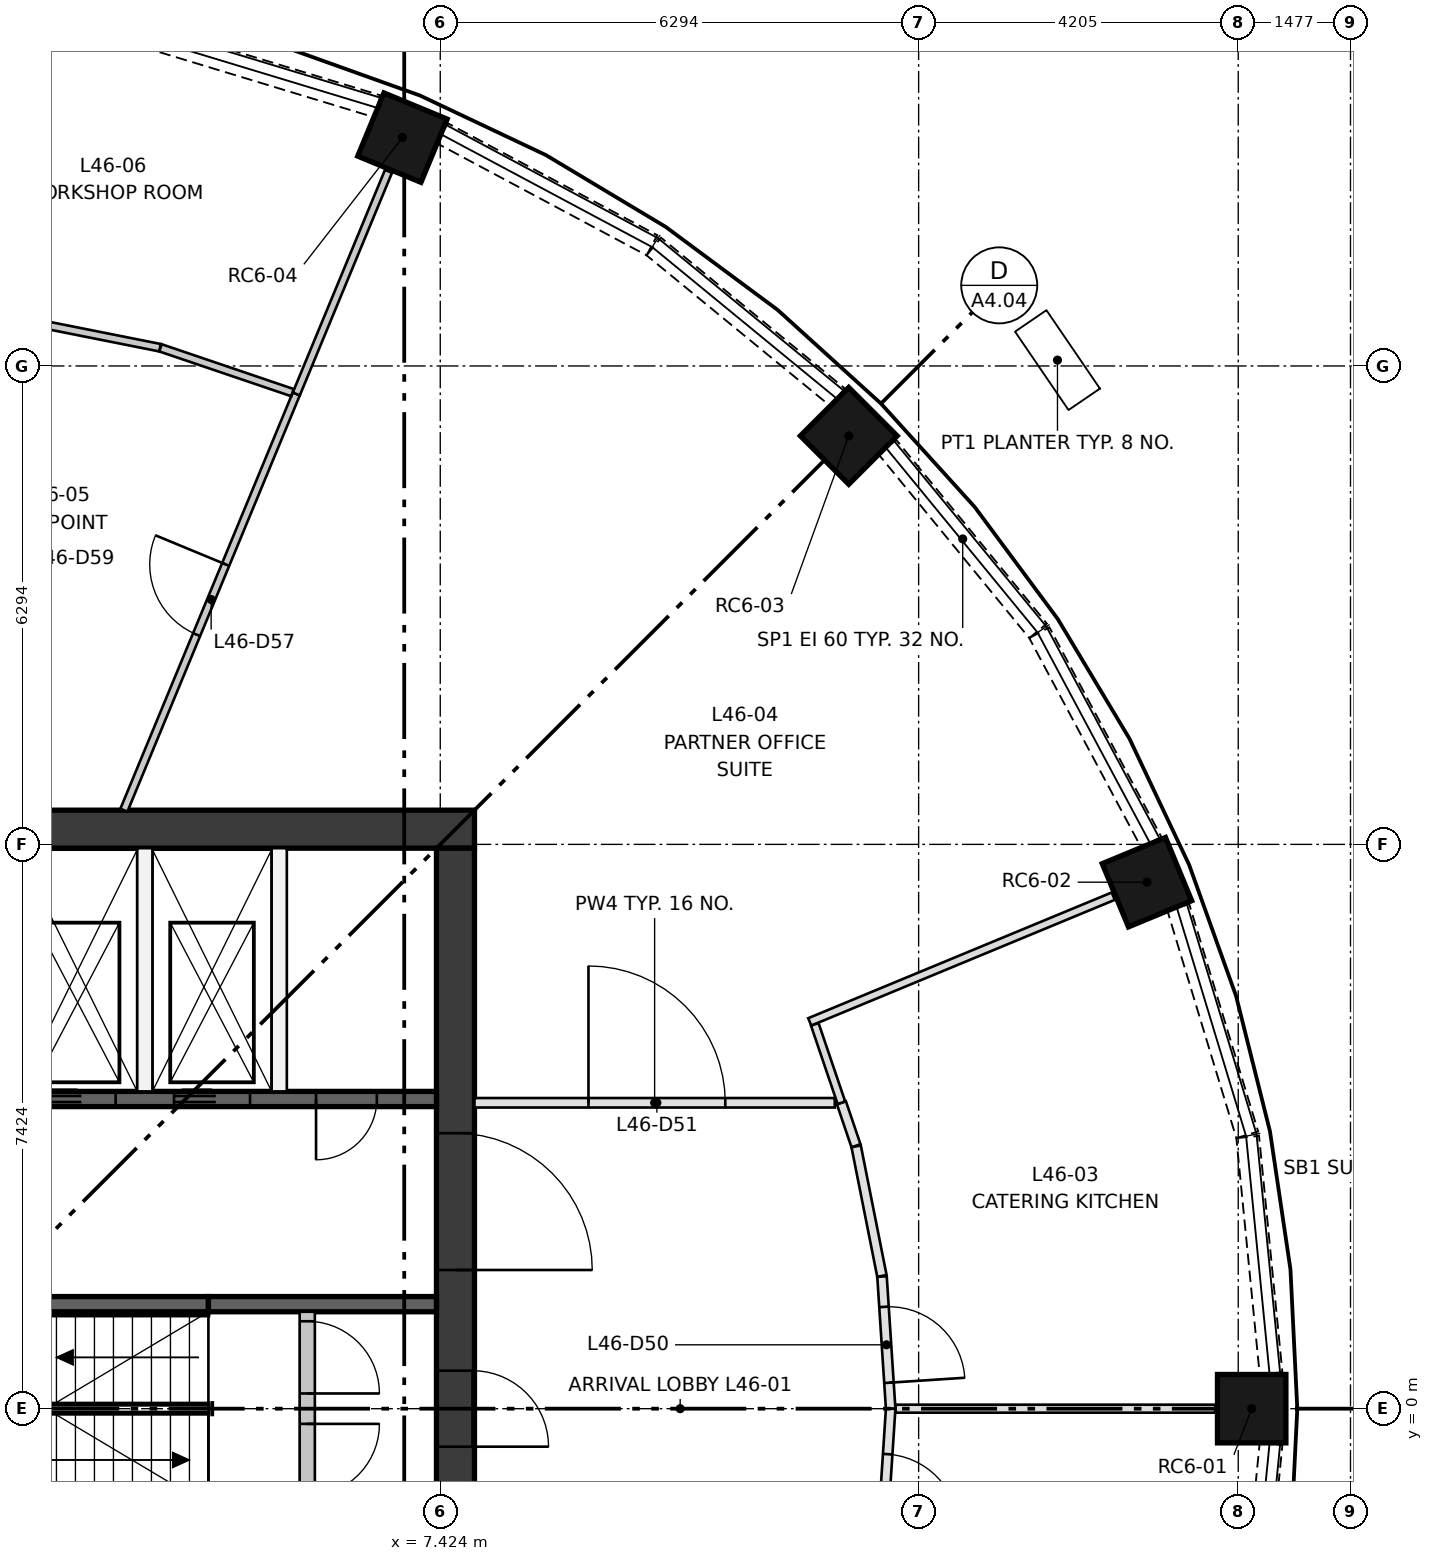
"""IFC4 building model, lengths in metres.
Left out: names, types, materials, properties, quantities, classifications, styles, units other than length and angle.
Written with IfcOpenShell. Run it as: python <this file> out.ifc"""

import sys

from ifc_helpers import new_model, si_unit, direction, frame, frame_2d, origin, origin_2d, place, context, subcontext, project, spatial, rectangle, extrude, element, fill, save


model = new_model("IFC4")
c1 = context("Model", 3, precision=1e-05, world=origin(), true_north=direction((0.0, 1.0)))
c2 = subcontext(c1, "Body", "Model", "MODEL_VIEW")
j1 = project(units=[si_unit("LENGTHUNIT", "METRE"), si_unit("PLANEANGLEUNIT", "RADIAN")], contexts=[c1])
p1 = place(None, origin())
s1 = spatial("IfcSite", under=j1, at=p1, CompositionType="ELEMENT")
p2 = place(p1, origin())
s2 = spatial("IfcBuilding", under=s1, at=p2, CompositionType="ELEMENT")
p3 = place(p2, frame((0.0, 0.0, 174.25)))
s3 = spatial("IfcBuildingStorey", under=s2, at=p3, CompositionType="ELEMENT", Elevation=174.25)
for number, where, z_axis, x_axis in (
    (1, (18.1, 0.0, 0.0), (0.0, 0.0, 1.0), (1.0, 0.0, 0.0)),
    (2, (16.722, 6.927, 0.0), (0.0, 0.0, 1.0), (0.924, 0.383, 0.0)),
    (3, (12.799, 12.799, 0.0), (0.0, 0.0, 1.0), (0.707, 0.707, 0.0)),
    (4, (6.927, 16.722, 0.0), (0.0, 0.0, 1.0), (0.383, 0.924, 0.0)),
):
    element("IfcColumn", number, at=place(p3, frame(where, z_axis=z_axis, x_axis=x_axis)), inside=s3, PredefinedType="COLUMN", context=c2, shape_type="SweptSolid", body=[
        extrude(rectangle(XDim=0.9, YDim=0.9, at=origin_2d()), origin(), (0.0, 0.0, 1.0), 3.35),
    ])
p4 = place(p3, frame((-7.874, 7.624, 0.0), z_axis=(0.0, 0.0, 1.0), x_axis=(1.0, 0.0, 0.0)))
e5 = element("IfcWall", 5, at=p4, inside=s3, PredefinedType="SHEAR", context=c2, shape_type="SweptSolid", body=[
    extrude(rectangle(XDim=15.748, YDim=0.5, at=frame_2d((7.874, 0.0))), origin(), (0.0, 0.0, 1.0), 3.35),
])
p5 = place(p3, frame((7.624, -7.374, 0.0), z_axis=(0.0, 0.0, 1.0), x_axis=(0.0, 1.0, 0.0)))
e6 = element("IfcWall", 6, at=p5, inside=s3, PredefinedType="SHEAR", context=c2, shape_type="SweptSolid", body=[
    extrude(rectangle(XDim=14.748, YDim=0.5, at=frame_2d((7.374, 0.0))), origin(), (0.0, 0.0, 1.0), 3.35),
])
p6 = place(p5, frame((6.874, 0.0, 0.0)))
e7 = element("IfcOpeningElement", 7, at=p6, cuts=e6, PredefinedType="OPENING", context=c2, shape_type="SweptSolid", body=[
    extrude(rectangle(XDim=1.0, YDim=2.1, at=frame_2d((0.5, 1.05))), frame((0.0, 0.26, 0.0), z_axis=(0.0, -1.0, 0.0), x_axis=(1.0, 0.0, 0.0)), (0.0, 0.0, 1.0), 0.52),
])
p7 = place(p5, frame((3.75, 0.0, 0.0)))
e8 = element("IfcOpeningElement", 8, at=p7, cuts=e6, PredefinedType="OPENING", context=c2, shape_type="SweptSolid", body=[
    extrude(rectangle(XDim=1.8, YDim=2.1, at=frame_2d((0.9, 1.05))), frame((0.0, 0.26, 0.0), z_axis=(0.0, -1.0, 0.0), x_axis=(1.0, 0.0, 0.0)), (0.0, 0.0, 1.0), 0.52),
])
p8 = place(p5, frame((9.198, 0.0, 0.0)))
e9 = element("IfcOpeningElement", 9, at=p8, cuts=e6, PredefinedType="OPENING", context=c2, shape_type="SweptSolid", body=[
    extrude(rectangle(XDim=1.8, YDim=2.1, at=frame_2d((0.9, 1.05))), frame((0.0, 0.26, 0.0), z_axis=(0.0, -1.0, 0.0), x_axis=(1.0, 0.0, 0.0)), (0.0, 0.0, 1.0), 0.52),
])
p9 = place(p3, frame((0.0, 4.074, 0.0), z_axis=(0.0, 0.0, 1.0), x_axis=(1.0, 0.0, 0.0)))
e10 = element("IfcWall", 10, at=p9, inside=s3, PredefinedType="SHEAR", context=c2, shape_type="SweptSolid", body=[
    extrude(rectangle(XDim=7.374, YDim=0.2, at=frame_2d((3.687, 0.0))), origin(), (0.0, 0.0, 1.0), 3.0),
])
p10 = place(p9, frame((0.384, 0.0, 0.0)))
e11 = element("IfcOpeningElement", 11, at=p10, cuts=e10, PredefinedType="OPENING", context=c2, shape_type="SweptSolid", body=[
    extrude(rectangle(XDim=1.0, YDim=2.1, at=frame_2d((0.5, 1.05))), frame((0.0, 0.11, 0.0), z_axis=(0.0, -1.0, 0.0), x_axis=(1.0, 0.0, 0.0)), (0.0, 0.0, 1.0), 0.22),
])
p11 = place(p9, frame((2.153, 0.0, 0.0)))
e12 = element("IfcOpeningElement", 12, at=p11, cuts=e10, PredefinedType="OPENING", context=c2, shape_type="SweptSolid", body=[
    extrude(rectangle(XDim=1.0, YDim=2.1, at=frame_2d((0.5, 1.05))), frame((0.0, 0.11, 0.0), z_axis=(0.0, -1.0, 0.0), x_axis=(1.0, 0.0, 0.0)), (0.0, 0.0, 1.0), 0.22),
])
p12 = place(p9, frame((3.921, 0.0, 0.0)))
e13 = element("IfcOpeningElement", 13, at=p12, cuts=e10, PredefinedType="OPENING", context=c2, shape_type="SweptSolid", body=[
    extrude(rectangle(XDim=1.0, YDim=2.1, at=frame_2d((0.5, 1.05))), frame((0.0, 0.11, 0.0), z_axis=(0.0, -1.0, 0.0), x_axis=(1.0, 0.0, 0.0)), (0.0, 0.0, 1.0), 0.22),
])
p13 = place(p9, frame((5.79, 0.0, 0.0)))
e14 = element("IfcOpeningElement", 14, at=p13, cuts=e10, PredefinedType="OPENING", context=c2, shape_type="SweptSolid", body=[
    extrude(rectangle(XDim=0.8, YDim=2.1, at=frame_2d((0.4, 1.05))), frame((0.0, 0.11, 0.0), z_axis=(0.0, -1.0, 0.0), x_axis=(1.0, 0.0, 0.0)), (0.0, 0.0, 1.0), 0.22),
])
p14 = place(p3, frame((0.0, 1.375, 0.0), z_axis=(0.0, 0.0, 1.0), x_axis=(1.0, 0.0, 0.0)))
e15 = element("IfcWall", 15, at=p14, inside=s3, PredefinedType="SHEAR", context=c2, shape_type="SweptSolid", body=[
    extrude(rectangle(XDim=4.374, YDim=0.2, at=frame_2d((2.187, 0.0))), origin(), (0.0, 0.0, 1.0), 3.0),
])
p15 = place(p3, frame((4.374, 1.375, 0.0), z_axis=(0.0, 0.0, 1.0), x_axis=(1.0, 0.0, 0.0)))
e16 = element("IfcWall", 16, at=p15, inside=s3, PredefinedType="SHEAR", context=c2, shape_type="SweptSolid", body=[
    extrude(rectangle(XDim=3.0, YDim=0.2, at=frame_2d((1.5, 0.0))), origin(), (0.0, 0.0, 1.0), 3.0),
])
for number, where, z_axis, x_axis in (
    (17, (3.537, 4.174, 0.0), (0.0, 0.0, 1.0), (0.0, 1.0, 0.0)),
    (18, (5.305, 4.174, 0.0), (0.0, 0.0, 1.0), (0.0, 1.0, 0.0)),
):
    element("IfcWall", number, at=place(p3, frame(where, z_axis=z_axis, x_axis=x_axis)), inside=s3, PredefinedType="PARTITIONING", context=c2, shape_type="SweptSolid", body=[
        extrude(rectangle(XDim=3.2, YDim=0.2, at=frame_2d((1.6, 0.0))), origin(), (0.0, 0.0, 1.0), 3.0),
    ])
p16 = place(p3, frame((5.674, -1.275, 0.0), z_axis=(0.0, 0.0, 1.0), x_axis=(0.0, 1.0, 0.0)))
e19 = element("IfcWall", 19, at=p16, inside=s3, PredefinedType="PARTITIONING", context=c2, shape_type="SweptSolid", body=[
    extrude(rectangle(XDim=2.55, YDim=0.2, at=frame_2d((1.275, 0.0))), origin(), (0.0, 0.0, 1.0), 3.0),
])
p17 = place(p16, frame((0.125, 0.0, 0.0)))
e20 = element("IfcOpeningElement", 20, at=p17, cuts=e19, PredefinedType="OPENING", context=c2, shape_type="SweptSolid", body=[
    extrude(rectangle(XDim=0.95, YDim=2.1, at=frame_2d((0.475, 1.05))), frame((0.0, 0.11, 0.0), z_axis=(0.0, -1.0, 0.0), x_axis=(1.0, 0.0, 0.0)), (0.0, 0.0, 1.0), 0.22),
])
p18 = place(p16, frame((1.475, 0.0, 0.0)))
e21 = element("IfcOpeningElement", 21, at=p18, cuts=e19, PredefinedType="OPENING", context=c2, shape_type="SweptSolid", body=[
    extrude(rectangle(XDim=0.95, YDim=2.1, at=frame_2d((0.475, 1.05))), frame((0.0, 0.11, 0.0), z_axis=(0.0, -1.0, 0.0), x_axis=(1.0, 0.0, 0.0)), (0.0, 0.0, 1.0), 0.22),
])
p19 = place(p3, frame((18.354, 0.464, 0.0), z_axis=(0.0, 0.0, 1.0), x_axis=(-0.098188848083, 0.995167799978, 0.0)))
e22 = element("IfcWall", 22, at=p19, inside=s3, PredefinedType="SOLIDWALL", context=c2, shape_type="SweptSolid", body=[
    extrude(rectangle(XDim=3.125, YDim=0.3, at=frame_2d((1.563, 0.0))), origin(), (0.0, 0.0, 1.0), 0.9),
])
p20 = place(p3, frame((18.042, 3.604, 0.0), z_axis=(0.0, 0.0, 1.0), x_axis=(-0.290083245834, 0.957001416136, 0.0)))
e23 = element("IfcWall", 23, at=p20, inside=s3, PredefinedType="SOLIDWALL", context=c2, shape_type="SweptSolid", body=[
    extrude(rectangle(XDim=3.127, YDim=0.3, at=frame_2d((1.563, 0.0))), origin(), (0.0, 0.0, 1.0), 0.9),
])
p21 = place(p3, frame((16.779, 7.452, 0.0), z_axis=(0.0, 0.0, 1.0), x_axis=(-0.47120441036, 0.882024038027, 0.0)))
e24 = element("IfcWall", 24, at=p21, inside=s3, PredefinedType="SOLIDWALL", context=c2, shape_type="SweptSolid", body=[
    extrude(rectangle(XDim=3.125, YDim=0.3, at=frame_2d((1.562, 0.0))), origin(), (0.0, 0.0, 1.0), 0.9),
])
for number, where, z_axis, x_axis in (
    (25, (15.29, 10.234, 0.0), (0.0, 0.0, 1.0), (-0.634, 0.773, 0.0)),
    (26, (12.651, 13.306, 0.0), (0.0, 0.0, 1.0), (-0.773, 0.634, 0.0)),
):
    element("IfcWall", number, at=place(p3, frame(where, z_axis=z_axis, x_axis=x_axis)), inside=s3, PredefinedType="SOLIDWALL", context=c2, shape_type="SweptSolid", body=[
        extrude(rectangle(XDim=3.127, YDim=0.3, at=frame_2d((1.563, 0.0))), origin(), (0.0, 0.0, 1.0), 0.9),
    ])
p22 = place(p3, frame((10.209, 15.306, 0.0), z_axis=(0.0, 0.0, 1.0), x_axis=(-0.882024038027, 0.47120441036, 0.0)))
e27 = element("IfcWall", 27, at=p22, inside=s3, PredefinedType="SOLIDWALL", context=c2, shape_type="SweptSolid", body=[
    extrude(rectangle(XDim=3.125, YDim=0.3, at=frame_2d((1.562, 0.0))), origin(), (0.0, 0.0, 1.0), 0.9),
])
p23 = place(p3, frame((6.596, 17.135, 0.0), z_axis=(0.0, 0.0, 1.0), x_axis=(-0.957001416136, 0.290083245834, 0.0)))
e28 = element("IfcWall", 28, at=p23, inside=s3, PredefinedType="SOLIDWALL", context=c2, shape_type="SweptSolid", body=[
    extrude(rectangle(XDim=3.127, YDim=0.3, at=frame_2d((1.563, 0.0))), origin(), (0.0, 0.0, 1.0), 0.9),
])
p24 = place(p3, frame((18.048, -3.574, 0.0), z_axis=(0.0, 0.0, 1.0), x_axis=(0.098188848083, 0.995167799978, 0.0)))
e29 = element("IfcWall", 29, at=p24, inside=s3, PredefinedType="SOLIDWALL", context=c2, shape_type="SweptSolid", body=[
    extrude(rectangle(XDim=3.125, YDim=0.3, at=frame_2d((1.563, 0.0))), origin(), (0.0, 0.0, 1.0), 0.9),
])
p25 = place(p3, frame((12.702, 4.024, 0.0), z_axis=(0.0, 0.0, 1.0), x_axis=(0.321374914787, -0.946952038989, 0.0)))
e30 = element("IfcWall", 30, at=p25, inside=s3, PredefinedType="PARTITIONING", context=c2, shape_type="SweptSolid", body=[
    extrude(rectangle(XDim=0.597, YDim=0.125, at=frame_2d((0.299, 0.0))), origin(), (0.0, 0.0, 1.0), 3.0),
])
p26 = place(p3, frame((12.896, 3.451, 0.0), z_axis=(0.0, 0.0, 1.0), x_axis=(0.195116516296, -0.980780069673, 0.0)))
e31 = element("IfcWall", 31, at=p26, inside=s3, PredefinedType="PARTITIONING", context=c2, shape_type="SweptSolid", body=[
    extrude(rectangle(XDim=1.738, YDim=0.125, at=frame_2d((0.869, 0.0))), origin(), (0.0, 0.0, 1.0), 3.0),
])
p27 = place(p3, frame((13.236, 1.738, 0.0), z_axis=(0.0, 0.0, 1.0), x_axis=(0.065449256286, -0.997855898841, 0.0)))
e32 = element("IfcWall", 32, at=p27, inside=s3, PredefinedType="PARTITIONING", context=c2, shape_type="SweptSolid", body=[
    extrude(rectangle(XDim=1.742, YDim=0.125, at=frame_2d((0.871, 0.0))), origin(), (0.0, 0.0, 1.0), 3.0),
])
p28 = place(p27, frame((0.4, 0.0, 0.0)))
e33 = element("IfcOpeningElement", 33, at=p28, cuts=e32, PredefinedType="OPENING", context=c2, shape_type="SweptSolid", body=[
    extrude(rectangle(XDim=1.0, YDim=2.1, at=frame_2d((0.5, 1.05))), frame((0.0, 0.073, 0.0), z_axis=(0.0, -1.0, 0.0), x_axis=(1.0, 0.0, 0.0)), (0.0, 0.0, 1.0), 0.145),
])
p29 = place(p3, frame((7.874, 4.024, 0.0), z_axis=(0.0, 0.0, 1.0), x_axis=(1.0, 0.0, 0.0)))
e34 = element("IfcWall", 34, at=p29, inside=s3, PredefinedType="PARTITIONING", context=c2, shape_type="SweptSolid", body=[
    extrude(rectangle(XDim=4.741, YDim=0.125, at=frame_2d((2.37, 0.0))), origin(), (0.0, 0.0, 1.0), 3.0),
])
p30 = place(p29, frame((1.5, 0.0, 0.0)))
e35 = element("IfcOpeningElement", 35, at=p30, cuts=e34, PredefinedType="OPENING", context=c2, shape_type="SweptSolid", body=[
    extrude(rectangle(XDim=1.8, YDim=2.1, at=frame_2d((0.9, 1.05))), frame((0.0, 0.073, 0.0), z_axis=(0.0, -1.0, 0.0), x_axis=(1.0, 0.0, 0.0)), (0.0, 0.0, 1.0), 0.145),
])
p31 = place(p3, frame((13.35, 0.0, 0.0), z_axis=(0.0, 0.0, 1.0), x_axis=(-0.065449256286, -0.997855898841, 0.0)))
e36 = element("IfcWall", 36, at=p31, inside=s3, PredefinedType="PARTITIONING", context=c2, shape_type="SweptSolid", body=[
    extrude(rectangle(XDim=1.742, YDim=0.125, at=frame_2d((0.871, 0.0))), origin(), (0.0, 0.0, 1.0), 3.0),
])
p32 = place(p31, frame((0.6, 0.0, 0.0)))
e37 = element("IfcOpeningElement", 37, at=p32, cuts=e36, PredefinedType="OPENING", context=c2, shape_type="SweptSolid", body=[
    extrude(rectangle(XDim=1.0, YDim=2.1, at=frame_2d((0.5, 1.05))), frame((0.0, 0.073, 0.0), z_axis=(0.0, -1.0, 0.0), x_axis=(1.0, 0.0, 0.0)), (0.0, 0.0, 1.0), 0.145),
])
p33 = place(p3, frame((12.285, 5.089, 0.0), z_axis=(0.0, 0.0, 1.0), x_axis=(0.923865378524, 0.382717601325, 0.0)))
e38 = element("IfcWall", 38, at=p33, inside=s3, PredefinedType="PARTITIONING", context=c2, shape_type="SweptSolid", body=[
    extrude(rectangle(XDim=4.323, YDim=0.105, at=frame_2d((2.161, 0.0))), origin(), (0.0, 0.0, 1.0), 3.0),
])
p34 = place(p3, frame((12.702, 4.024, 0.0), z_axis=(0.0, 0.0, 1.0), x_axis=(-0.321468654442, 0.946920220616, 0.0)))
e39 = element("IfcWall", 39, at=p34, inside=s3, PredefinedType="PARTITIONING", context=c2, shape_type="SweptSolid", body=[
    extrude(rectangle(XDim=1.089, YDim=0.105, at=frame_2d((0.544, 0.0))), origin(), (0.0, 0.0, 1.0), 3.0),
])
p35 = place(p3, frame((17.62, 0.0, 0.0), z_axis=(0.0, 0.0, 1.0), x_axis=(-1.0, 0.0, 0.0)))
e40 = element("IfcWall", 40, at=p35, inside=s3, PredefinedType="PARTITIONING", context=c2, shape_type="SweptSolid", body=[
    extrude(rectangle(XDim=4.204, YDim=0.105, at=frame_2d((2.102, 0.0))), origin(), (0.0, 0.0, 1.0), 3.0),
])
p36 = place(p3, frame((3.261, 7.874, 0.0), z_axis=(0.0, 0.0, 1.0), x_axis=(0.382690105068, 0.923876768559, 0.0)))
e41 = element("IfcWall", 41, at=p36, inside=s3, PredefinedType="PARTITIONING", context=c2, shape_type="SweptSolid", body=[
    extrude(rectangle(XDim=5.927, YDim=0.1, at=frame_2d((2.964, 0.0))), origin(), (0.0, 0.0, 1.0), 3.0),
])
p37 = place(p36, frame((2.5, 0.0, 0.0)))
e42 = element("IfcOpeningElement", 42, at=p37, cuts=e41, PredefinedType="OPENING", context=c2, shape_type="SweptSolid", body=[
    extrude(rectangle(XDim=1.0, YDim=2.1, at=frame_2d((0.5, 1.05))), frame((0.0, 0.06, 0.0), z_axis=(0.0, -1.0, 0.0), x_axis=(1.0, 0.0, 0.0)), (0.0, 0.0, 1.0), 0.12),
])
p38 = place(p3, frame((5.53, 13.35, 0.0), z_axis=(0.0, 0.0, 1.0), x_axis=(0.382689618566, 0.923876970079, 0.0)))
e43 = element("IfcWall", 43, at=p38, inside=s3, PredefinedType="PARTITIONING", context=c2, shape_type="SweptSolid", body=[
    extrude(rectangle(XDim=3.17, YDim=0.1, at=frame_2d((1.585, 0.0))), origin(), (0.0, 0.0, 1.0), 3.0),
])
p39 = place(p3, frame((1.889, 14.326, 0.0), z_axis=(0.0, 0.0, 1.0), x_axis=(0.980789493394, -0.195069140684, 0.0)))
e44 = element("IfcWall", 44, at=p39, inside=s3, PredefinedType="PARTITIONING", context=c2, shape_type="SweptSolid", body=[
    extrude(rectangle(XDim=1.884, YDim=0.1, at=frame_2d((0.942, 0.0))), origin(), (0.0, 0.0, 1.0), 3.0),
])
p40 = place(p3, frame((3.743, 13.957, 0.0), z_axis=(0.0, 0.0, 1.0), x_axis=(0.946938181516, -0.321415743839, 0.0)))
e45 = element("IfcWall", 45, at=p40, inside=s3, PredefinedType="PARTITIONING", context=c2, shape_type="SweptSolid", body=[
    extrude(rectangle(XDim=1.834, YDim=0.1, at=frame_2d((0.917, 0.0))), origin(), (0.0, 0.0, 1.0), 3.0),
])
p41 = place(p11, frame((1.0, 0.0, 0.0), z_axis=(0.0, 0.0, 1.0), x_axis=(-1.0, 0.0, 0.0)))
e46 = element("IfcDoor", 46, at=p41, inside=s3, OperationType="DOUBLE_DOOR_SLIDING", PredefinedType="DOOR", context=c2, shape_type="SweptSolid", body=[
    extrude(rectangle(XDim=1.0, YDim=2.1, at=frame_2d((0.5, 1.05))), frame((0.0, 0.025, 0.0), z_axis=(0.0, -1.0, 0.0), x_axis=(1.0, 0.0, 0.0)), (0.0, 0.0, 1.0), 0.05),
])
fill(e12, e46)
p42 = place(p12, frame((1.0, 0.0, 0.0), z_axis=(0.0, 0.0, 1.0), x_axis=(-1.0, 0.0, 0.0)))
e47 = element("IfcDoor", 47, at=p42, inside=s3, OperationType="DOUBLE_DOOR_SLIDING", PredefinedType="DOOR", context=c2, shape_type="SweptSolid", body=[
    extrude(rectangle(XDim=1.0, YDim=2.1, at=frame_2d((0.5, 1.05))), frame((0.0, 0.025, 0.0), z_axis=(0.0, -1.0, 0.0), x_axis=(1.0, 0.0, 0.0)), (0.0, 0.0, 1.0), 0.05),
])
fill(e13, e47)
p43 = place(p17, frame((0.95, 0.0, 0.0), z_axis=(0.0, 0.0, 1.0), x_axis=(-1.0, 0.0, 0.0)))
e48 = element("IfcDoor", 48, at=p43, inside=s3, OperationType="SINGLE_SWING_RIGHT", PredefinedType="DOOR", context=c2, shape_type="SweptSolid", body=[
    extrude(rectangle(XDim=0.95, YDim=2.1, at=frame_2d((0.475, 1.05))), frame((0.0, 0.025, 0.0), z_axis=(0.0, -1.0, 0.0), x_axis=(1.0, 0.0, 0.0)), (0.0, 0.0, 1.0), 0.05),
])
fill(e20, e48)
p44 = place(p18, frame((0.95, 0.0, 0.0), z_axis=(0.0, 0.0, 1.0), x_axis=(-1.0, 0.0, 0.0)))
e49 = element("IfcDoor", 49, at=p44, inside=s3, OperationType="SINGLE_SWING_LEFT", PredefinedType="DOOR", context=c2, shape_type="SweptSolid", body=[
    extrude(rectangle(XDim=0.95, YDim=2.1, at=frame_2d((0.475, 1.05))), frame((0.0, 0.025, 0.0), z_axis=(0.0, -1.0, 0.0), x_axis=(1.0, 0.0, 0.0)), (0.0, 0.0, 1.0), 0.05),
])
fill(e21, e49)
p45 = place(p13, frame((0.8, 0.0, 0.0), z_axis=(0.0, 0.0, 1.0), x_axis=(-1.0, 0.0, 0.0)))
e50 = element("IfcDoor", 50, at=p45, inside=s3, OperationType="SINGLE_SWING_LEFT", PredefinedType="DOOR", context=c2, shape_type="SweptSolid", body=[
    extrude(rectangle(XDim=0.8, YDim=2.1, at=frame_2d((0.4, 1.05))), frame((0.0, 0.025, 0.0), z_axis=(0.0, -1.0, 0.0), x_axis=(1.0, 0.0, 0.0)), (0.0, 0.0, 1.0), 0.05),
])
fill(e14, e50)
p46 = place(p6, frame((1.0, 0.0, 0.0), z_axis=(0.0, 0.0, 1.0), x_axis=(-1.0, 0.0, 0.0)))
e51 = element("IfcDoor", 51, at=p46, inside=s3, OperationType="SINGLE_SWING_LEFT", PredefinedType="DOOR", context=c2, shape_type="SweptSolid", body=[
    extrude(rectangle(XDim=1.0, YDim=2.1, at=frame_2d((0.5, 1.05))), frame((0.0, 0.25, 0.0), z_axis=(0.0, -1.0, 0.0), x_axis=(1.0, 0.0, 0.0)), (0.0, 0.0, 1.0), 0.05),
])
fill(e7, e51)
p47 = place(p8, frame((1.8, 0.0, 0.0), z_axis=(0.0, 0.0, 1.0), x_axis=(-1.0, 0.0, 0.0)))
e52 = element("IfcDoor", 52, at=p47, inside=s3, OperationType="DOUBLE_DOOR_SINGLE_SWING", PredefinedType="DOOR", context=c2, shape_type="SweptSolid", body=[
    extrude(rectangle(XDim=1.8, YDim=2.1, at=frame_2d((0.9, 1.05))), frame((0.0, 0.025, 0.0), z_axis=(0.0, -1.0, 0.0), x_axis=(1.0, 0.0, 0.0)), (0.0, 0.0, 1.0), 0.05),
])
fill(e9, e52)
p48 = place(p28, origin())
e53 = element("IfcDoor", 53, at=p48, inside=s3, OperationType="SINGLE_SWING_RIGHT", PredefinedType="DOOR", context=c2, shape_type="SweptSolid", body=[
    extrude(rectangle(XDim=1.0, YDim=2.1, at=frame_2d((0.5, 1.05))), frame((0.0, 0.025, 0.0), z_axis=(0.0, -1.0, 0.0), x_axis=(1.0, 0.0, 0.0)), (0.0, 0.0, 1.0), 0.05),
])
fill(e33, e53)
p49 = place(p30, origin())
e54 = element("IfcDoor", 54, at=p49, inside=s3, OperationType="DOUBLE_DOOR_SINGLE_SWING", PredefinedType="DOOR", context=c2, shape_type="SweptSolid", body=[
    extrude(rectangle(XDim=1.8, YDim=2.1, at=frame_2d((0.9, 1.05))), frame((0.0, 0.025, 0.0), z_axis=(0.0, -1.0, 0.0), x_axis=(1.0, 0.0, 0.0)), (0.0, 0.0, 1.0), 0.05),
])
fill(e35, e54)
p50 = place(p32, origin())
e55 = element("IfcDoor", 55, at=p50, inside=s3, OperationType="SINGLE_SWING_RIGHT", PredefinedType="DOOR", context=c2, shape_type="SweptSolid", body=[
    extrude(rectangle(XDim=1.0, YDim=2.1, at=frame_2d((0.5, 1.05))), frame((0.0, 0.025, 0.0), z_axis=(0.0, -1.0, 0.0), x_axis=(1.0, 0.0, 0.0)), (0.0, 0.0, 1.0), 0.05),
])
fill(e37, e55)
p51 = place(p37, origin())
e56 = element("IfcDoor", 56, at=p51, inside=s3, OperationType="SINGLE_SWING_RIGHT", PredefinedType="DOOR", context=c2, shape_type="SweptSolid", body=[
    extrude(rectangle(XDim=1.0, YDim=2.1, at=frame_2d((0.5, 1.05))), frame((0.0, 0.025, 0.0), z_axis=(0.0, -1.0, 0.0), x_axis=(1.0, 0.0, 0.0)), (0.0, 0.0, 1.0), 0.05),
])
fill(e42, e56)
save(model, sys.argv[1])
